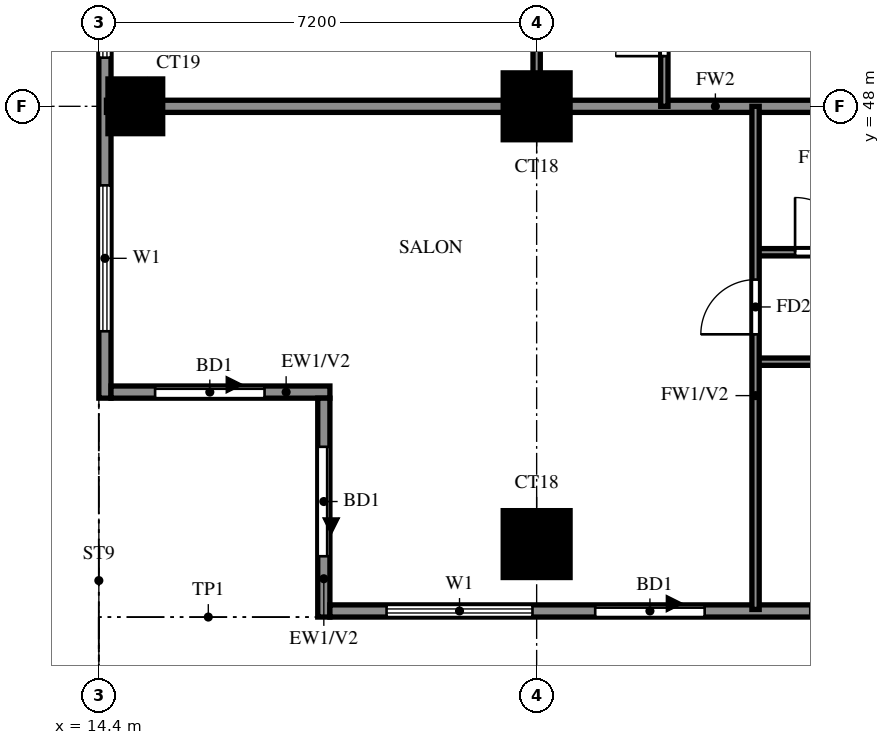
"""IFC4 building model, lengths in metres.
Left out: names, types, materials, properties, quantities, classifications, styles, units other than length and angle.
Written with IfcOpenShell. Run it as: python <this file> out.ifc"""

import sys

from ifc_helpers import new_model, si_unit, direction, frame, frame_2d, origin, origin_2d, place, context, subcontext, project, spatial, rectangle, extrude, source, transform, mapped, element, fill, save


model = new_model("IFC4")
c1 = context("Model", 3, precision=1e-05, world=origin(), true_north=direction((0.0, 1.0)))
c2 = subcontext(c1, "Body", "Model", "MODEL_VIEW")
j1 = project(units=[si_unit("LENGTHUNIT", "METRE"), si_unit("PLANEANGLEUNIT", "RADIAN")], contexts=[c1])
p1 = place(None, origin())
s1 = spatial("IfcSite", under=j1, at=p1, CompositionType="ELEMENT")
p2 = place(p1, origin())
s2 = spatial("IfcBuilding", under=s1, at=p2, CompositionType="ELEMENT")
p3 = place(p2, frame((0.0, 0.0, 113.0)))
s3 = spatial("IfcBuildingStorey", under=s2, at=p3, CompositionType="ELEMENT", Elevation=113.0)
m1 = source(origin(), c2, "Body", "SweptSolid", [
    extrude(rectangle(XDim=1.1, YDim=1.1, at=origin_2d()), origin(), (0.0, 0.0, 1.0), 3.2),
])
p4 = place(p3, frame((21.6, 40.8, 0.0), z_axis=(0.0, 0.0, 1.0), x_axis=(1.0, 0.0, 0.0)))
e1 = element("IfcColumn", 1, at=p4, inside=s3, PredefinedType="COLUMN", context=c2, shape_type="MappedRepresentation", body=[
    mapped(m1, transform((0.0, 0.0, 0.0))),
])
m2 = source(origin(), c2, "Body", "SweptSolid", [
    extrude(rectangle(XDim=0.9, YDim=0.9, at=origin_2d()), origin(), (0.0, 0.0, 1.0), 3.2),
])
p5 = place(p3, frame((15.0, 48.0, 0.0), z_axis=(0.0, 0.0, 1.0), x_axis=(1.0, 0.0, 0.0)))
e2 = element("IfcColumn", 2, at=p5, inside=s3, PredefinedType="COLUMN", context=c2, shape_type="MappedRepresentation", body=[
    mapped(m2, transform((0.0, 0.0, 0.0))),
])
p6 = place(p3, frame((21.6, 48.0, 0.0), z_axis=(0.0, 0.0, 1.0), x_axis=(1.0, 0.0, 0.0)))
e3 = element("IfcColumn", 3, at=p6, inside=s3, PredefinedType="COLUMN", context=c2, shape_type="MappedRepresentation", body=[
    mapped(m1, transform((0.0, 0.0, 0.0))),
])
p7 = place(p3, frame((14.5, 76.6, 0.0), z_axis=(0.0, 0.0, 1.0), x_axis=(0.0, -1.0, 0.0)))
e4 = element("IfcWall", 4, at=p7, inside=s3, PredefinedType="SOLIDWALL", context=c2, shape_type="SweptSolid", body=[
    extrude(rectangle(XDim=33.4, YDim=0.2, at=frame_2d((16.7, 0.0))), origin(), (0.0, 0.0, 1.0), 3.2),
])
p8 = place(p7, frame((29.9, 0.0, 0.6)))
e5 = element("IfcOpeningElement", 5, at=p8, cuts=e4, PredefinedType="OPENING", context=c2, shape_type="SweptSolid", body=[
    extrude(rectangle(XDim=2.4, YDim=2.4, at=frame_2d((1.2, 1.2))), frame((0.0, 0.11, 0.0), z_axis=(0.0, -1.0, 0.0), x_axis=(1.0, 0.0, 0.0)), (0.0, 0.0, 1.0), 0.22),
])
p9 = place(p7, frame((25.4, 0.0, 0.6)))
e6 = element("IfcOpeningElement", 6, at=p9, cuts=e4, PredefinedType="OPENING", context=c2, shape_type="SweptSolid", body=[
    extrude(rectangle(XDim=2.4, YDim=2.4, at=frame_2d((1.2, 1.2))), frame((0.0, 0.11, 0.0), z_axis=(0.0, -1.0, 0.0), x_axis=(1.0, 0.0, 0.0)), (0.0, 0.0, 1.0), 0.22),
])
p10 = place(p7, frame((18.2, 0.0, 0.6)))
e7 = element("IfcOpeningElement", 7, at=p10, cuts=e4, PredefinedType="OPENING", context=c2, shape_type="SweptSolid", body=[
    extrude(rectangle(XDim=2.4, YDim=2.4, at=frame_2d((1.2, 1.2))), frame((0.0, 0.11, 0.0), z_axis=(0.0, -1.0, 0.0), x_axis=(1.0, 0.0, 0.0)), (0.0, 0.0, 1.0), 0.22),
])
p11 = place(p7, frame((22.5, 0.0, 0.6)))
e8 = element("IfcOpeningElement", 8, at=p11, cuts=e4, PredefinedType="OPENING", context=c2, shape_type="SweptSolid", body=[
    extrude(rectangle(XDim=1.8, YDim=2.4, at=frame_2d((0.9, 1.2))), frame((0.0, 0.11, 0.0), z_axis=(0.0, -1.0, 0.0), x_axis=(1.0, 0.0, 0.0)), (0.0, 0.0, 1.0), 0.22),
])
p12 = place(p7, frame((15.3, 0.0, 0.6)))
e9 = element("IfcOpeningElement", 9, at=p12, cuts=e4, PredefinedType="OPENING", context=c2, shape_type="SweptSolid", body=[
    extrude(rectangle(XDim=1.8, YDim=2.4, at=frame_2d((0.9, 1.2))), frame((0.0, 0.11, 0.0), z_axis=(0.0, -1.0, 0.0), x_axis=(1.0, 0.0, 0.0)), (0.0, 0.0, 1.0), 0.22),
])
p13 = place(p7, frame((11.0, 0.0, 0.6)))
e10 = element("IfcOpeningElement", 10, at=p13, cuts=e4, PredefinedType="OPENING", context=c2, shape_type="SweptSolid", body=[
    extrude(rectangle(XDim=2.4, YDim=2.4, at=frame_2d((1.2, 1.2))), frame((0.0, 0.11, 0.0), z_axis=(0.0, -1.0, 0.0), x_axis=(1.0, 0.0, 0.0)), (0.0, 0.0, 1.0), 0.22),
])
p14 = place(p7, frame((7.8, 0.0, 0.6)))
e11 = element("IfcOpeningElement", 11, at=p14, cuts=e4, PredefinedType="OPENING", context=c2, shape_type="SweptSolid", body=[
    extrude(rectangle(XDim=2.4, YDim=2.4, at=frame_2d((1.2, 1.2))), frame((0.0, 0.11, 0.0), z_axis=(0.0, -1.0, 0.0), x_axis=(1.0, 0.0, 0.0)), (0.0, 0.0, 1.0), 0.22),
])
p15 = place(p7, frame((4.55, 0.0, 1.5)))
e12 = element("IfcOpeningElement", 12, at=p15, cuts=e4, PredefinedType="OPENING", context=c2, shape_type="SweptSolid", body=[
    extrude(rectangle(XDim=0.9, YDim=0.9, at=frame_2d((0.45, 0.45))), frame((0.0, 0.11, 0.0), z_axis=(0.0, -1.0, 0.0), x_axis=(1.0, 0.0, 0.0)), (0.0, 0.0, 1.0), 0.22),
])
p16 = place(p7, frame((0.6, 0.0, 0.6)))
e13 = element("IfcOpeningElement", 13, at=p16, cuts=e4, PredefinedType="OPENING", context=c2, shape_type="SweptSolid", body=[
    extrude(rectangle(XDim=2.4, YDim=2.4, at=frame_2d((1.2, 1.2))), frame((0.0, 0.11, 0.0), z_axis=(0.0, -1.0, 0.0), x_axis=(1.0, 0.0, 0.0)), (0.0, 0.0, 1.0), 0.22),
])
p17 = place(p3, frame((14.6, 43.3, 0.0), z_axis=(0.0, 0.0, 1.0), x_axis=(1.0, 0.0, 0.0)))
e14 = element("IfcWall", 14, at=p17, inside=s3, PredefinedType="SOLIDWALL", context=c2, shape_type="SweptSolid", body=[
    extrude(rectangle(XDim=3.6, YDim=0.2, at=frame_2d((1.8, 0.0))), origin(), (0.0, 0.0, 1.0), 3.2),
])
p18 = place(p17, frame((0.725, 0.0, 0.0)))
e15 = element("IfcOpeningElement", 15, at=p18, cuts=e14, PredefinedType="OPENING", context=c2, shape_type="SweptSolid", body=[
    extrude(rectangle(XDim=1.8, YDim=2.4, at=frame_2d((0.9, 1.2))), frame((0.0, 0.11, 0.0), z_axis=(0.0, -1.0, 0.0), x_axis=(1.0, 0.0, 0.0)), (0.0, 0.0, 1.0), 0.22),
])
p19 = place(p3, frame((18.1, 43.2, 0.0), z_axis=(0.0, 0.0, 1.0), x_axis=(0.0, -1.0, 0.0)))
e16 = element("IfcWall", 16, at=p19, inside=s3, PredefinedType="SOLIDWALL", context=c2, shape_type="SweptSolid", body=[
    extrude(rectangle(XDim=3.6, YDim=0.2, at=frame_2d((1.8, 0.0))), origin(), (0.0, 0.0, 1.0), 3.2),
])
p20 = place(p19, frame((0.8, 0.0, 0.0)))
e17 = element("IfcOpeningElement", 17, at=p20, cuts=e16, PredefinedType="OPENING", context=c2, shape_type="SweptSolid", body=[
    extrude(rectangle(XDim=1.8, YDim=2.4, at=frame_2d((0.9, 1.2))), frame((0.0, 0.11, 0.0), z_axis=(0.0, -1.0, 0.0), x_axis=(1.0, 0.0, 0.0)), (0.0, 0.0, 1.0), 0.22),
])
p21 = place(p3, frame((18.2, 39.7, 0.0), z_axis=(0.0, 0.0, 1.0), x_axis=(1.0, 0.0, 0.0)))
e18 = element("IfcWall", 18, at=p21, inside=s3, PredefinedType="SOLIDWALL", context=c2, shape_type="SweptSolid", body=[
    extrude(rectangle(XDim=23.8, YDim=0.2, at=frame_2d((11.9, 0.0))), origin(), (0.0, 0.0, 1.0), 3.2),
])
p22 = place(p21, frame((4.363, 0.0, 0.0)))
e19 = element("IfcOpeningElement", 19, at=p22, cuts=e18, PredefinedType="OPENING", context=c2, shape_type="SweptSolid", body=[
    extrude(rectangle(XDim=1.8, YDim=2.4, at=frame_2d((0.9, 1.2))), frame((0.0, 0.11, 0.0), z_axis=(0.0, -1.0, 0.0), x_axis=(1.0, 0.0, 0.0)), (0.0, 0.0, 1.0), 0.22),
])
p23 = place(p21, frame((7.9, 0.0, 0.0)))
e20 = element("IfcOpeningElement", 20, at=p23, cuts=e18, PredefinedType="OPENING", context=c2, shape_type="SweptSolid", body=[
    extrude(rectangle(XDim=1.8, YDim=2.4, at=frame_2d((0.9, 1.2))), frame((0.0, 0.11, 0.0), z_axis=(0.0, -1.0, 0.0), x_axis=(1.0, 0.0, 0.0)), (0.0, 0.0, 1.0), 0.22),
])
p24 = place(p21, frame((0.931, 0.0, 0.6)))
e21 = element("IfcOpeningElement", 21, at=p24, cuts=e18, PredefinedType="OPENING", context=c2, shape_type="SweptSolid", body=[
    extrude(rectangle(XDim=2.4, YDim=2.4, at=frame_2d((1.2, 1.2))), frame((0.0, 0.11, 0.0), z_axis=(0.0, -1.0, 0.0), x_axis=(1.0, 0.0, 0.0)), (0.0, 0.0, 1.0), 0.22),
])
p25 = place(p21, frame((10.9, 0.0, 0.6)))
e22 = element("IfcOpeningElement", 22, at=p25, cuts=e18, PredefinedType="OPENING", context=c2, shape_type="SweptSolid", body=[
    extrude(rectangle(XDim=1.2, YDim=2.4, at=frame_2d((0.6, 1.2))), frame((0.0, 0.11, 0.0), z_axis=(0.0, -1.0, 0.0), x_axis=(1.0, 0.0, 0.0)), (0.0, 0.0, 1.0), 0.22),
])
p26 = place(p21, frame((13.3, 0.0, 0.6)))
e23 = element("IfcOpeningElement", 23, at=p26, cuts=e18, PredefinedType="OPENING", context=c2, shape_type="SweptSolid", body=[
    extrude(rectangle(XDim=1.8, YDim=2.4, at=frame_2d((0.9, 1.2))), frame((0.0, 0.11, 0.0), z_axis=(0.0, -1.0, 0.0), x_axis=(1.0, 0.0, 0.0)), (0.0, 0.0, 1.0), 0.22),
])
p27 = place(p3, frame((14.525, 48.0, 0.0), z_axis=(0.0, 0.0, 1.0), x_axis=(1.0, 0.0, 0.0)))
e24 = element("IfcWall", 24, at=p27, inside=s3, PredefinedType="SOLIDWALL", context=c2, shape_type="SweptSolid", body=[
    extrude(rectangle(XDim=19.075, YDim=0.2, at=frame_2d((9.538, 0.0))), origin(), (0.0, 0.0, 1.0), 3.2),
])
p28 = place(p3, frame((25.2, 43.8, 0.0), z_axis=(0.0, 0.0, 1.0), x_axis=(1.0, 0.0, 0.0)))
e25 = element("IfcWall", 25, at=p28, inside=s3, PredefinedType="PARTITIONING", context=c2, shape_type="SweptSolid", body=[
    extrude(rectangle(XDim=8.4, YDim=0.12, at=frame_2d((4.2, 0.0))), origin(), (0.0, 0.0, 1.0), 3.2),
])
p29 = place(p28, frame((1.35, 0.0, 0.0)))
e26 = element("IfcOpeningElement", 26, at=p29, cuts=e25, PredefinedType="OPENING", context=c2, shape_type="SweptSolid", body=[
    extrude(rectangle(XDim=0.9, YDim=2.1, at=frame_2d((0.45, 1.05))), frame((0.0, 0.07, 0.0), z_axis=(0.0, -1.0, 0.0), x_axis=(1.0, 0.0, 0.0)), (0.0, 0.0, 1.0), 0.14),
])
p30 = place(p28, frame((5.55, 0.0, 0.0)))
e27 = element("IfcOpeningElement", 27, at=p30, cuts=e25, PredefinedType="OPENING", context=c2, shape_type="SweptSolid", body=[
    extrude(rectangle(XDim=0.9, YDim=2.1, at=frame_2d((0.45, 1.05))), frame((0.0, 0.07, 0.0), z_axis=(0.0, -1.0, 0.0), x_axis=(1.0, 0.0, 0.0)), (0.0, 0.0, 1.0), 0.14),
])
p31 = place(p3, frame((25.2, 45.6, 0.0), z_axis=(0.0, 0.0, 1.0), x_axis=(1.0, 0.0, 0.0)))
e28 = element("IfcWall", 28, at=p31, inside=s3, PredefinedType="PARTITIONING", context=c2, shape_type="SweptSolid", body=[
    extrude(rectangle(XDim=6.0, YDim=0.12, at=frame_2d((3.0, 0.0))), origin(), (0.0, 0.0, 1.0), 3.2),
])
p32 = place(p31, frame((0.65, 0.0, 0.0)))
e29 = element("IfcOpeningElement", 29, at=p32, cuts=e28, PredefinedType="OPENING", context=c2, shape_type="SweptSolid", body=[
    extrude(rectangle(XDim=0.9, YDim=2.1, at=frame_2d((0.45, 1.05))), frame((0.0, 0.07, 0.0), z_axis=(0.0, -1.0, 0.0), x_axis=(1.0, 0.0, 0.0)), (0.0, 0.0, 1.0), 0.14),
])
p33 = place(p31, frame((3.65, 0.0, 0.0)))
e30 = element("IfcOpeningElement", 30, at=p33, cuts=e28, PredefinedType="OPENING", context=c2, shape_type="SweptSolid", body=[
    extrude(rectangle(XDim=0.9, YDim=2.1, at=frame_2d((0.45, 1.05))), frame((0.0, 0.07, 0.0), z_axis=(0.0, -1.0, 0.0), x_axis=(1.0, 0.0, 0.0)), (0.0, 0.0, 1.0), 0.14),
])
p34 = place(p3, frame((21.6, 48.0, 0.0), z_axis=(0.0, 0.0, 1.0), x_axis=(0.0, 1.0, 0.0)))
e31 = element("IfcWall", 31, at=p34, inside=s3, PredefinedType="PARTITIONING", context=c2, shape_type="SweptSolid", body=[
    extrude(rectangle(XDim=21.6, YDim=0.12, at=frame_2d((10.8, 0.0))), origin(), (0.0, 0.0, 1.0), 3.2),
])
p35 = place(p34, frame((1.35, 0.0, 0.0)))
e32 = element("IfcOpeningElement", 32, at=p35, cuts=e31, PredefinedType="OPENING", context=c2, shape_type="SweptSolid", body=[
    extrude(rectangle(XDim=0.9, YDim=2.1, at=frame_2d((0.45, 1.05))), frame((0.0, 0.07, 0.0), z_axis=(0.0, -1.0, 0.0), x_axis=(1.0, 0.0, 0.0)), (0.0, 0.0, 1.0), 0.14),
])
p36 = place(p34, frame((7.95, 0.0, 0.0)))
e33 = element("IfcOpeningElement", 33, at=p36, cuts=e31, PredefinedType="OPENING", context=c2, shape_type="SweptSolid", body=[
    extrude(rectangle(XDim=1.5, YDim=2.1, at=frame_2d((0.75, 1.05))), frame((0.0, 0.07, 0.0), z_axis=(0.0, -1.0, 0.0), x_axis=(1.0, 0.0, 0.0)), (0.0, 0.0, 1.0), 0.14),
])
p37 = place(p34, frame((12.15, 0.0, 0.0)))
e34 = element("IfcOpeningElement", 34, at=p37, cuts=e31, PredefinedType="OPENING", context=c2, shape_type="SweptSolid", body=[
    extrude(rectangle(XDim=0.9, YDim=2.1, at=frame_2d((0.45, 1.05))), frame((0.0, 0.07, 0.0), z_axis=(0.0, -1.0, 0.0), x_axis=(1.0, 0.0, 0.0)), (0.0, 0.0, 1.0), 0.14),
])
p38 = place(p34, frame((15.75, 0.0, 0.0)))
e35 = element("IfcOpeningElement", 35, at=p38, cuts=e31, PredefinedType="OPENING", context=c2, shape_type="SweptSolid", body=[
    extrude(rectangle(XDim=0.9, YDim=2.1, at=frame_2d((0.45, 1.05))), frame((0.0, 0.07, 0.0), z_axis=(0.0, -1.0, 0.0), x_axis=(1.0, 0.0, 0.0)), (0.0, 0.0, 1.0), 0.14),
])
p39 = place(p34, frame((19.35, 0.0, 0.0)))
e36 = element("IfcOpeningElement", 36, at=p39, cuts=e31, PredefinedType="OPENING", context=c2, shape_type="SweptSolid", body=[
    extrude(rectangle(XDim=0.9, YDim=2.1, at=frame_2d((0.45, 1.05))), frame((0.0, 0.07, 0.0), z_axis=(0.0, -1.0, 0.0), x_axis=(1.0, 0.0, 0.0)), (0.0, 0.0, 1.0), 0.14),
])
p40 = place(p3, frame((23.7, 48.0, 0.0), z_axis=(0.0, 0.0, 1.0), x_axis=(0.0, 1.0, 0.0)))
e37 = element("IfcWall", 37, at=p40, inside=s3, PredefinedType="PARTITIONING", context=c2, shape_type="SweptSolid", body=[
    extrude(rectangle(XDim=7.2, YDim=0.12, at=frame_2d((3.6, 0.0))), origin(), (0.0, 0.0, 1.0), 3.2),
])
p41 = place(p40, frame((0.825, 0.0, 0.0)))
e38 = element("IfcOpeningElement", 38, at=p41, cuts=e37, PredefinedType="OPENING", context=c2, shape_type="SweptSolid", body=[
    extrude(rectangle(XDim=0.8, YDim=2.1, at=frame_2d((0.4, 1.05))), frame((0.0, 0.07, 0.0), z_axis=(0.0, -1.0, 0.0), x_axis=(1.0, 0.0, 0.0)), (0.0, 0.0, 1.0), 0.14),
])
p42 = place(p3, frame((25.2, 39.725, 0.0), z_axis=(0.0, 0.0, 1.0), x_axis=(0.0, 1.0, 0.0)))
e39 = element("IfcWall", 39, at=p42, inside=s3, PredefinedType="PARTITIONING", context=c2, shape_type="SweptSolid", body=[
    extrude(rectangle(XDim=8.275, YDim=0.12, at=frame_2d((4.137, 0.0))), origin(), (0.0, 0.0, 1.0), 3.2),
])
p43 = place(p42, frame((4.525, 0.0, 0.0)))
e40 = element("IfcOpeningElement", 40, at=p43, cuts=e39, PredefinedType="OPENING", context=c2, shape_type="SweptSolid", body=[
    extrude(rectangle(XDim=0.9, YDim=2.1, at=frame_2d((0.45, 1.05))), frame((0.0, 0.07, 0.0), z_axis=(0.0, -1.0, 0.0), x_axis=(1.0, 0.0, 0.0)), (0.0, 0.0, 1.0), 0.14),
])
p44 = place(p8, origin())
e41 = element("IfcWindow", 41, at=p44, inside=s3, PartitioningType="DOUBLE_PANEL_VERTICAL", PredefinedType="WINDOW", context=c2, shape_type="SweptSolid", body=[
    extrude(rectangle(XDim=2.4, YDim=2.4, at=frame_2d((1.2, 1.2))), frame((0.0, 0.03, 0.0), z_axis=(0.0, -1.0, 0.0), x_axis=(1.0, 0.0, 0.0)), (0.0, 0.0, 1.0), 0.06),
])
fill(e5, e41)
p45 = place(p9, origin())
e42 = element("IfcWindow", 42, at=p45, inside=s3, PartitioningType="DOUBLE_PANEL_VERTICAL", PredefinedType="WINDOW", context=c2, shape_type="SweptSolid", body=[
    extrude(rectangle(XDim=2.4, YDim=2.4, at=frame_2d((1.2, 1.2))), frame((0.0, 0.03, 0.0), z_axis=(0.0, -1.0, 0.0), x_axis=(1.0, 0.0, 0.0)), (0.0, 0.0, 1.0), 0.06),
])
fill(e6, e42)
p46 = place(p18, origin())
e43 = element("IfcDoor", 43, at=p46, inside=s3, OperationType="DOUBLE_DOOR_SLIDING", PredefinedType="DOOR", context=c2, shape_type="SweptSolid", body=[
    extrude(rectangle(XDim=1.8, YDim=2.4, at=frame_2d((0.9, 1.2))), frame((0.0, 0.025, 0.0), z_axis=(0.0, -1.0, 0.0), x_axis=(1.0, 0.0, 0.0)), (0.0, 0.0, 1.0), 0.05),
])
fill(e15, e43)
p47 = place(p20, origin())
e44 = element("IfcDoor", 44, at=p47, inside=s3, OperationType="DOUBLE_DOOR_SLIDING", PredefinedType="DOOR", context=c2, shape_type="SweptSolid", body=[
    extrude(rectangle(XDim=1.8, YDim=2.4, at=frame_2d((0.9, 1.2))), frame((0.0, 0.025, 0.0), z_axis=(0.0, -1.0, 0.0), x_axis=(1.0, 0.0, 0.0)), (0.0, 0.0, 1.0), 0.05),
])
fill(e17, e44)
p48 = place(p22, origin())
e45 = element("IfcDoor", 45, at=p48, inside=s3, OperationType="DOUBLE_DOOR_SLIDING", PredefinedType="DOOR", context=c2, shape_type="SweptSolid", body=[
    extrude(rectangle(XDim=1.8, YDim=2.4, at=frame_2d((0.9, 1.2))), frame((0.0, 0.025, 0.0), z_axis=(0.0, -1.0, 0.0), x_axis=(1.0, 0.0, 0.0)), (0.0, 0.0, 1.0), 0.05),
])
fill(e19, e45)
p49 = place(p23, origin())
e46 = element("IfcDoor", 46, at=p49, inside=s3, OperationType="DOUBLE_DOOR_SLIDING", PredefinedType="DOOR", context=c2, shape_type="SweptSolid", body=[
    extrude(rectangle(XDim=1.8, YDim=2.4, at=frame_2d((0.9, 1.2))), frame((0.0, 0.025, 0.0), z_axis=(0.0, -1.0, 0.0), x_axis=(1.0, 0.0, 0.0)), (0.0, 0.0, 1.0), 0.05),
])
fill(e20, e46)
p50 = place(p24, origin())
e47 = element("IfcWindow", 47, at=p50, inside=s3, PartitioningType="DOUBLE_PANEL_VERTICAL", PredefinedType="WINDOW", context=c2, shape_type="SweptSolid", body=[
    extrude(rectangle(XDim=2.4, YDim=2.4, at=frame_2d((1.2, 1.2))), frame((0.0, 0.03, 0.0), z_axis=(0.0, -1.0, 0.0), x_axis=(1.0, 0.0, 0.0)), (0.0, 0.0, 1.0), 0.06),
])
fill(e21, e47)
p51 = place(p43, origin())
e48 = element("IfcDoor", 48, at=p51, inside=s3, OperationType="SINGLE_SWING_RIGHT", PredefinedType="DOOR", context=c2, shape_type="SweptSolid", body=[
    extrude(rectangle(XDim=0.9, YDim=2.1, at=frame_2d((0.45, 1.05))), frame((0.0, 0.025, 0.0), z_axis=(0.0, -1.0, 0.0), x_axis=(1.0, 0.0, 0.0)), (0.0, 0.0, 1.0), 0.05),
])
fill(e40, e48)
p52 = place(p32, origin())
e49 = element("IfcDoor", 49, at=p52, inside=s3, OperationType="SINGLE_SWING_RIGHT", PredefinedType="DOOR", context=c2, shape_type="SweptSolid", body=[
    extrude(rectangle(XDim=0.9, YDim=2.1, at=frame_2d((0.45, 1.05))), frame((0.0, 0.025, 0.0), z_axis=(0.0, -1.0, 0.0), x_axis=(1.0, 0.0, 0.0)), (0.0, 0.0, 1.0), 0.05),
])
fill(e29, e49)
p53 = place(p41, origin())
e50 = element("IfcDoor", 50, at=p53, inside=s3, OperationType="SINGLE_SWING_LEFT", PredefinedType="DOOR", context=c2, shape_type="SweptSolid", body=[
    extrude(rectangle(XDim=0.8, YDim=2.1, at=frame_2d((0.4, 1.05))), frame((0.0, 0.025, 0.0), z_axis=(0.0, -1.0, 0.0), x_axis=(1.0, 0.0, 0.0)), (0.0, 0.0, 1.0), 0.05),
])
fill(e38, e50)
save(model, sys.argv[1])
